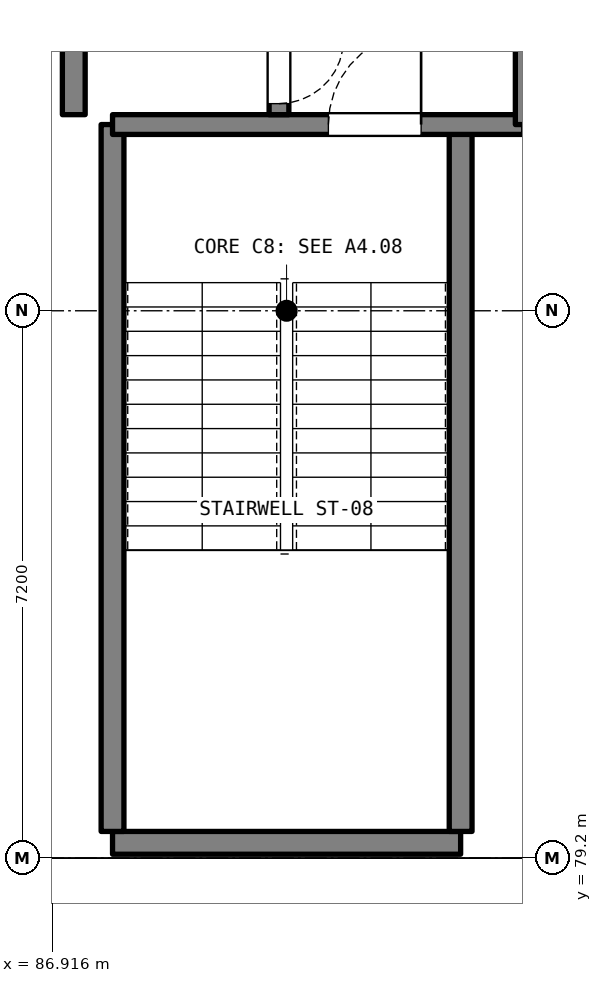
"""IFC4 building model, lengths in metres.
Left out: names, types, materials, properties, quantities, classifications, styles, units other than length and angle.
Written with IfcOpenShell. Run it as: python <this file> out.ifc"""

import sys

from ifc_helpers import new_model, si_unit, direction, frame, frame_2d, origin, place, context, subcontext, project, spatial, rectangle, extrude, element, fill, save


model = new_model("IFC4")
c1 = context("Model", 3, precision=1e-05, world=origin(), true_north=direction((0.0, 1.0)))
c2 = subcontext(c1, "Body", "Model", "MODEL_VIEW")
j1 = project(units=[si_unit("LENGTHUNIT", "METRE"), si_unit("PLANEANGLEUNIT", "RADIAN")], contexts=[c1])
p1 = place(None, origin())
s1 = spatial("IfcSite", under=j1, at=p1, CompositionType="ELEMENT")
p2 = place(p1, origin())
s2 = spatial("IfcBuilding", under=s1, at=p2, CompositionType="ELEMENT")
p3 = place(p2, frame((0.0, 0.0, 21.9)))
s3 = spatial("IfcBuildingStorey", under=s2, at=p3, CompositionType="ELEMENT", Elevation=21.9)
p4 = place(p3, frame((87.71, 79.4, 0.0), z_axis=(0.0, 0.0, 1.0), x_axis=(1.0, 0.0, 0.0)))
e1 = element("IfcWall", 1, at=p4, inside=s3, PredefinedType="SHEAR", context=c2, shape_type="SweptSolid", body=[
    extrude(rectangle(XDim=4.58, YDim=0.3, at=frame_2d((2.29, 0.0))), origin(), (0.0, 0.0, 1.0), 3.72),
])
for number, where, z_axis, x_axis in (
    (2, (87.71, 79.55, 0.0), (0.0, 0.0, 1.0), (0.0, 1.0, 0.0)),
    (3, (92.29, 79.55, 0.0), (0.0, 0.0, 1.0), (0.0, 1.0, 0.0)),
):
    element("IfcWall", number, at=place(p3, frame(where, z_axis=z_axis, x_axis=x_axis)), inside=s3, PredefinedType="SHEAR", context=c2, shape_type="SweptSolid", body=[
        extrude(rectangle(XDim=9.3, YDim=0.3, at=frame_2d((4.65, 0.0))), origin(), (0.0, 0.0, 1.0), 3.72),
    ])
p5 = place(p3, frame((87.71, 88.85, 0.0), z_axis=(0.0, 0.0, 1.0), x_axis=(1.0, 0.0, 0.0)))
e4 = element("IfcWall", 4, at=p5, inside=s3, PredefinedType="SHEAR", context=c2, shape_type="SweptSolid", body=[
    extrude(rectangle(XDim=5.41, YDim=0.26, at=frame_2d((2.705, 0.0))), origin(), (0.0, 0.0, 1.0), 3.72),
])
p6 = place(p5, frame((2.84, 0.0, 0.0)))
e5 = element("IfcOpeningElement", 5, at=p6, cuts=e4, PredefinedType="OPENING", context=c2, shape_type="SweptSolid", body=[
    extrude(rectangle(XDim=1.22, YDim=2.15, at=frame_2d((0.61, 1.075))), frame((0.0, 0.14, 0.0), z_axis=(0.0, -1.0, 0.0), x_axis=(1.0, 0.0, 0.0)), (0.0, 0.0, 1.0), 0.28),
])
p7 = place(p3, frame((87.2, 88.98, 0.0), z_axis=(0.0, 0.0, 1.0), x_axis=(0.0, 1.0, 0.0)))
e6 = element("IfcWall", 6, at=p7, inside=s3, PredefinedType="SHEAR", context=c2, shape_type="SweptSolid", body=[
    extrude(rectangle(XDim=4.32, YDim=0.3, at=frame_2d((2.16, 0.0))), origin(), (0.0, 0.0, 1.0), 3.72),
])
p8 = place(p3, frame((89.9, 93.3, 0.0), z_axis=(0.0, 0.0, 1.0), x_axis=(0.0, -1.0, 0.0)))
e7 = element("IfcWall", 7, at=p8, inside=s3, PredefinedType="SHEAR", context=c2, shape_type="SweptSolid", body=[
    extrude(rectangle(XDim=4.32, YDim=0.26, at=frame_2d((2.16, 0.0))), origin(), (0.0, 0.0, 1.0), 3.72),
])
p9 = place(p8, frame((1.0, 0.0, 0.0)))
e8 = element("IfcOpeningElement", 8, at=p9, cuts=e7, PredefinedType="OPENING", context=c2, shape_type="SweptSolid", body=[
    extrude(rectangle(XDim=1.2, YDim=2.15, at=frame_2d((0.6, 1.075))), frame((0.0, 0.14, 0.0), z_axis=(0.0, -1.0, 0.0), x_axis=(1.0, 0.0, 0.0)), (0.0, 0.0, 1.0), 0.28),
])
p10 = place(p8, frame((3.325, 0.0, 0.0)))
e9 = element("IfcOpeningElement", 9, at=p10, cuts=e7, PredefinedType="OPENING", context=c2, shape_type="SweptSolid", body=[
    extrude(rectangle(XDim=0.85, YDim=2.05, at=frame_2d((0.425, 1.025))), frame((0.0, 0.14, 0.0), z_axis=(0.0, -1.0, 0.0), x_axis=(1.0, 0.0, 0.0)), (0.0, 0.0, 1.0), 0.28),
])
p11 = place(p3, frame((93.12, 93.3, 0.0), z_axis=(0.0, 0.0, 1.0), x_axis=(0.0, -1.0, 0.0)))
e10 = element("IfcWall", 10, at=p11, inside=s3, PredefinedType="SHEAR", context=c2, shape_type="SweptSolid", body=[
    extrude(rectangle(XDim=4.45, YDim=0.22, at=frame_2d((2.225, 0.0))), origin(), (0.0, 0.0, 1.0), 3.72),
])
p12 = place(p11, frame((1.55, 0.0, 0.0)))
e11 = element("IfcOpeningElement", 11, at=p12, cuts=e10, PredefinedType="OPENING", context=c2, shape_type="SweptSolid", body=[
    extrude(rectangle(XDim=1.6, YDim=2.2, at=frame_2d((0.8, 1.1))), frame((0.0, 0.12, 0.0), z_axis=(0.0, -1.0, 0.0), x_axis=(1.0, 0.0, 0.0)), (0.0, 0.0, 1.0), 0.24),
])
p13 = place(p6, origin())
e12 = element("IfcDoor", 12, at=p13, inside=s3, OperationType="SINGLE_SWING_RIGHT", PredefinedType="DOOR", context=c2, shape_type="SweptSolid", body=[
    extrude(rectangle(XDim=1.22, YDim=2.15, at=frame_2d((0.61, 1.075))), frame((0.0, 0.025, 0.0), z_axis=(0.0, -1.0, 0.0), x_axis=(1.0, 0.0, 0.0)), (0.0, 0.0, 1.0), 0.05),
])
fill(e5, e12)
p14 = place(p10, origin())
e13 = element("IfcDoor", 13, at=p14, inside=s3, OperationType="SINGLE_SWING_LEFT", PredefinedType="DOOR", context=c2, shape_type="SweptSolid", body=[
    extrude(rectangle(XDim=0.85, YDim=2.05, at=frame_2d((0.425, 1.025))), frame((0.0, 0.025, 0.0), z_axis=(0.0, -1.0, 0.0), x_axis=(1.0, 0.0, 0.0)), (0.0, 0.0, 1.0), 0.05),
])
fill(e9, e13)
save(model, sys.argv[1])
